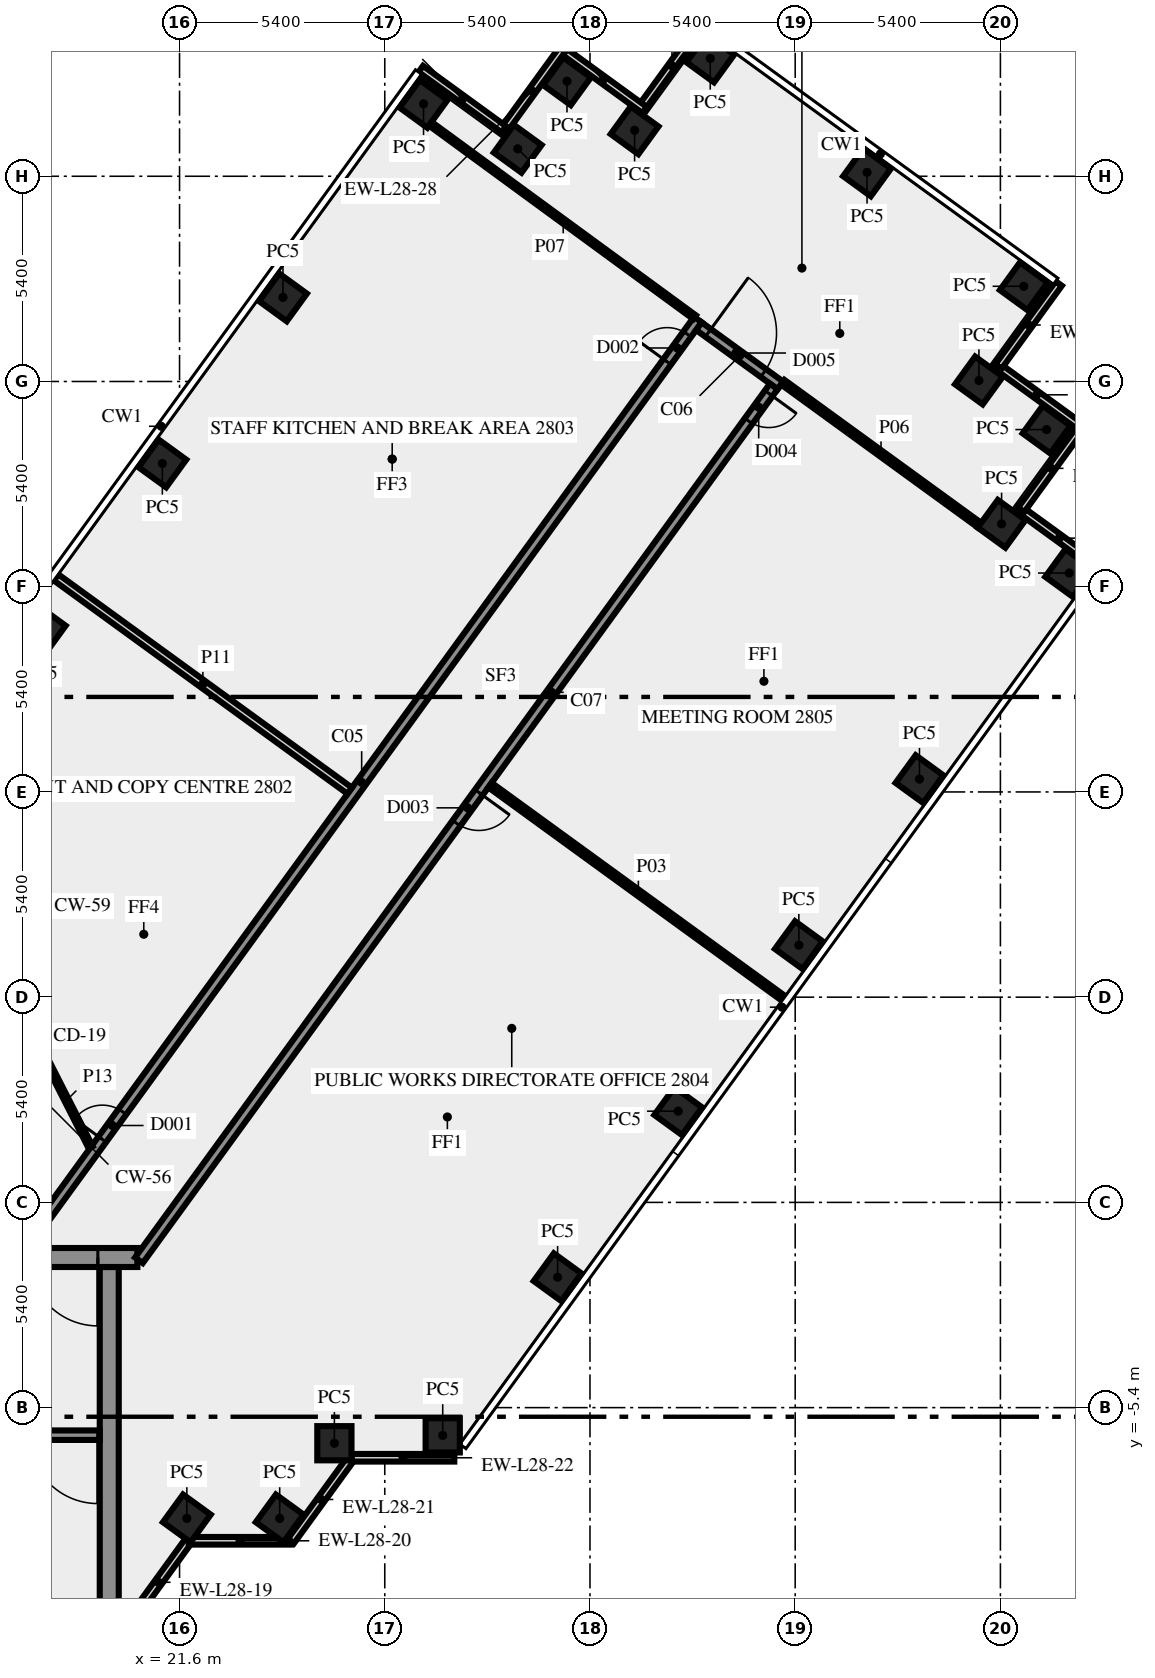
"""IFC4 building model, lengths in metres.
Left out: names, types, materials, properties, quantities, classifications, styles, units other than length and angle.
Written with IfcOpenShell. Run it as: python <this file> out.ifc"""

import sys

from ifc_helpers import new_model, si_unit, direction, frame, frame_2d, origin, origin_2d, place, context, subcontext, project, spatial, rectangle, extrude, element, fill, save


model = new_model("IFC4")
c1 = context("Model", 3, precision=1e-05, world=origin(), true_north=direction((0.0, 1.0)))
c2 = subcontext(c1, "Body", "Model", "MODEL_VIEW")
j1 = project(units=[si_unit("LENGTHUNIT", "METRE"), si_unit("PLANEANGLEUNIT", "RADIAN")], contexts=[c1])
p1 = place(None, origin())
s1 = spatial("IfcSite", under=j1, at=p1, CompositionType="ELEMENT")
p2 = place(p1, origin())
s2 = spatial("IfcBuilding", under=s1, at=p2, CompositionType="ELEMENT")
p3 = place(p2, frame((0.0, 0.0, 121.0)))
s3 = spatial("IfcBuildingStorey", under=s2, at=p3, CompositionType="ELEMENT", Elevation=121.0)
for number, where, z_axis, x_axis in (
    (1, (21.792, -8.315, 0.0), (0.0, 0.0, 1.0), (0.588, 0.809, 0.0)),
    (2, (24.235, -8.315, 0.0), (0.0, 0.0, 1.0), (0.588, 0.809, 0.0)),
    (3, (25.674, -6.337, 0.0), (0.0, 0.0, 1.0), (1.0, 0.0, 0.0)),
    (4, (28.525, -6.13, 0.0), (0.0, 0.0, 1.0), (1.0, 0.0, 0.0)),
    (5, (31.548, -1.969, 0.0), (0.0, 0.0, 1.0), (0.588, 0.809, 0.0)),
    (6, (34.722, 2.4, 0.0), (0.0, 0.0, 1.0), (0.588, 0.809, 0.0)),
    (7, (37.896, 6.769, 0.0), (0.0, 0.0, 1.0), (0.588, 0.809, 0.0)),
    (8, (41.07, 11.137, 0.0), (0.0, 0.0, 1.0), (0.588, 0.809, 0.0)),
    (9, (45.01, 16.56, 0.0), (0.0, 0.0, 1.0), (0.588, 0.809, 0.0)),
    (10, (43.231, 17.854, 0.0), (0.0, 0.0, 1.0), (0.588, 0.809, 0.0)),
    (11, (44.415, 20.335, 0.0), (0.0, 0.0, 1.0), (0.588, 0.809, 0.0)),
    (12, (42.635, 21.626, 0.0), (0.0, 0.0, 1.0), (-0.809, 0.588, 0.0)),
    (13, (43.815, 24.105, 0.0), (0.0, 0.0, 1.0), (-0.809, 0.588, 0.0)),
    (14, (39.691, 27.102, 0.0), (0.0, 0.0, 1.0), (-0.809, 0.588, 0.0)),
    (15, (35.565, 30.1, 0.0), (0.0, 0.0, 1.0), (-0.588, -0.809, 0.0)),
    (16, (33.574, 28.209, 0.0), (0.0, 0.0, 1.0), (-0.809, 0.588, 0.0)),
    (17, (31.795, 29.5, 0.0), (0.0, 0.0, 1.0), (-0.588, -0.809, 0.0)),
    (18, (30.499, 27.723, 0.0), (0.0, 0.0, 1.0), (-0.809, 0.588, 0.0)),
    (19, (28.02, 28.905, 0.0), (0.0, 0.0, 1.0), (-0.809, 0.588, 0.0)),
    (20, (24.321, 23.812, 0.0), (0.0, 0.0, 1.0), (-0.588, -0.809, 0.0)),
    (21, (21.147, 19.444, 0.0), (0.0, 0.0, 1.0), (-0.588, -0.809, 0.0)),
    (22, (17.974, 15.075, 0.0), (0.0, 0.0, 1.0), (-0.588, -0.809, 0.0)),
):
    element("IfcColumn", number, at=place(p3, frame(where, z_axis=z_axis, x_axis=x_axis)), inside=s3, PredefinedType="COLUMN", context=c2, shape_type="SweptSolid", body=[
        extrude(rectangle(XDim=0.9, YDim=0.9, at=origin_2d()), origin(), (0.0, 0.0, 1.0), 3.65),
    ])
for number, where, z_axis, x_axis in (
    (23, (45.842, 16.685, 0.0), (0.0, 0.0, 1.0), (-0.809, 0.588, 0.0)),
    (24, (43.746, 18.223, 0.0), (0.0, 0.0, 1.0), (0.588, 0.809, 0.0)),
    (25, (45.245, 20.456, 0.0), (0.0, 0.0, 1.0), (-0.809, 0.588, 0.0)),
):
    element("IfcWall", number, at=place(p3, frame(where, z_axis=z_axis, x_axis=x_axis)), inside=s3, PredefinedType="SOLIDWALL", context=c2, shape_type="SweptSolid", body=[
        extrude(rectangle(XDim=2.7, YDim=0.2, at=frame_2d((1.35, 0.0))), origin(), (0.0, 0.0, 1.0), 3.65),
    ])
p4 = place(p3, frame((20.253, -11.083, 0.0), z_axis=(0.0, 0.0, 1.0), x_axis=(0.587766567315, 0.809030569476, 0.0)))
e26 = element("IfcWall", 26, at=p4, inside=s3, PredefinedType="SOLIDWALL", context=c2, shape_type="SweptSolid", body=[
    extrude(rectangle(XDim=2.688, YDim=0.2, at=frame_2d((1.344, 0.0))), origin(), (0.0, 0.0, 1.0), 3.65),
])
p5 = place(p3, frame((21.843, -8.904, 0.0), z_axis=(0.0, 0.0, 1.0), x_axis=(1.0, 0.0, 0.0)))
e27 = element("IfcWall", 27, at=p5, inside=s3, PredefinedType="SOLIDWALL", context=c2, shape_type="SweptSolid", body=[
    extrude(rectangle(XDim=2.7, YDim=0.2, at=frame_2d((1.35, 0.0))), origin(), (0.0, 0.0, 1.0), 3.65),
])
p6 = place(p3, frame((24.533, -8.909, 0.0), z_axis=(0.0, 0.0, 1.0), x_axis=(0.587720002413, 0.809064397168, 0.0)))
e28 = element("IfcWall", 28, at=p6, inside=s3, PredefinedType="SOLIDWALL", context=c2, shape_type="SweptSolid", body=[
    extrude(rectangle(XDim=2.7, YDim=0.2, at=frame_2d((1.35, 0.0))), origin(), (0.0, 0.0, 1.0), 3.65),
])
for number, where, z_axis, x_axis in (
    (29, (26.13, -6.719, 0.0), (0.0, 0.0, 1.0), (1.0, 0.0, 0.0)),
    (30, (43.149, 21.994, 0.0), (0.0, 0.0, 1.0), (0.588, 0.809, 0.0)),
    (31, (35.351, 30.997, 0.0), (0.0, 0.0, 1.0), (-0.588, -0.809, 0.0)),
    (32, (33.838, 28.744, 0.0), (0.0, 0.0, 1.0), (-0.809, 0.588, 0.0)),
    (33, (31.67, 30.333, 0.0), (0.0, 0.0, 1.0), (-0.588, -0.809, 0.0)),
    (34, (30.133, 28.237, 0.0), (0.0, 0.0, 1.0), (-0.809, 0.588, 0.0)),
):
    element("IfcWall", number, at=place(p3, frame(where, z_axis=z_axis, x_axis=x_axis)), inside=s3, PredefinedType="SOLIDWALL", context=c2, shape_type="SweptSolid", body=[
        extrude(rectangle(XDim=2.7, YDim=0.2, at=frame_2d((1.35, 0.0))), origin(), (0.0, 0.0, 1.0), 3.65),
    ])
p7 = place(p3, frame((19.75, -10.5, 0.0), z_axis=(0.0, 0.0, 1.0), x_axis=(0.0, 1.0, 0.0)))
e35 = element("IfcWall", 35, at=p7, inside=s3, PredefinedType="SHEAR", context=c2, shape_type="SweptSolid", body=[
    extrude(rectangle(XDim=8.8, YDim=0.5, at=frame_2d((4.4, 0.0))), origin(), (0.0, 0.0, 1.0), 3.65),
])
p8 = place(p3, frame((19.5, -6.125, 0.0), z_axis=(0.0, 0.0, 1.0), x_axis=(-1.0, 0.0, 0.0)))
e36 = element("IfcWall", 36, at=p8, inside=s3, PredefinedType="SHEAR", context=c2, shape_type="SweptSolid", body=[
    extrude(rectangle(XDim=8.05, YDim=0.25, at=frame_2d((4.025, 0.0))), origin(), (0.0, 0.0, 1.0), 3.65),
])
p9 = place(p8, frame((0.05, 0.0, 0.0)))
e37 = element("IfcOpeningElement", 37, at=p9, cuts=e36, PredefinedType="OPENING", context=c2, shape_type="SweptSolid", body=[
    extrude(rectangle(XDim=1.8, YDim=2.1, at=frame_2d((0.9, 1.05))), frame((0.0, 0.135, 0.0), z_axis=(0.0, -1.0, 0.0), x_axis=(1.0, 0.0, 0.0)), (0.0, 0.0, 1.0), 0.27),
])
p10 = place(p3, frame((20.49, -1.45, 0.0), z_axis=(0.0, 0.0, 1.0), x_axis=(-1.0, 0.0, 0.0)))
e38 = element("IfcWall", 38, at=p10, inside=s3, PredefinedType="SHEAR", context=c2, shape_type="SweptSolid", body=[
    extrude(rectangle(XDim=40.98, YDim=0.5, at=frame_2d((20.49, 0.0))), origin(), (0.0, 0.0, 1.0), 3.65),
])
p11 = place(p10, frame((38.14, 0.0, 0.0)))
e39 = element("IfcOpeningElement", 39, at=p11, cuts=e38, PredefinedType="OPENING", context=c2, shape_type="SweptSolid", body=[
    extrude(rectangle(XDim=1.8, YDim=2.1, at=frame_2d((0.9, 1.05))), frame((0.0, 0.26, 0.0), z_axis=(0.0, -1.0, 0.0), x_axis=(1.0, 0.0, 0.0)), (0.0, 0.0, 1.0), 0.52),
])
p12 = place(p10, frame((35.89, 0.0, 0.0)))
e40 = element("IfcOpeningElement", 40, at=p12, cuts=e38, PredefinedType="OPENING", context=c2, shape_type="SweptSolid", body=[
    extrude(rectangle(XDim=0.9, YDim=2.1, at=frame_2d((0.45, 1.05))), frame((0.0, 0.26, 0.0), z_axis=(0.0, -1.0, 0.0), x_axis=(1.0, 0.0, 0.0)), (0.0, 0.0, 1.0), 0.52),
])
p13 = place(p10, frame((32.94, 0.0, 0.0)))
e41 = element("IfcOpeningElement", 41, at=p13, cuts=e38, PredefinedType="OPENING", context=c2, shape_type="SweptSolid", body=[
    extrude(rectangle(XDim=0.9, YDim=2.1, at=frame_2d((0.45, 1.05))), frame((0.0, 0.26, 0.0), z_axis=(0.0, -1.0, 0.0), x_axis=(1.0, 0.0, 0.0)), (0.0, 0.0, 1.0), 0.52),
])
p14 = place(p10, frame((19.59, 0.0, 0.0)))
e42 = element("IfcOpeningElement", 42, at=p14, cuts=e38, PredefinedType="OPENING", context=c2, shape_type="SweptSolid", body=[
    extrude(rectangle(XDim=2.0, YDim=2.1, at=frame_2d((1.0, 1.05))), frame((0.0, 0.26, 0.0), z_axis=(0.0, -1.0, 0.0), x_axis=(1.0, 0.0, 0.0)), (0.0, 0.0, 1.0), 0.52),
])
p15 = place(p10, frame((7.14, 0.0, 0.0)))
e43 = element("IfcOpeningElement", 43, at=p15, cuts=e38, PredefinedType="OPENING", context=c2, shape_type="SweptSolid", body=[
    extrude(rectangle(XDim=0.9, YDim=2.1, at=frame_2d((0.45, 1.05))), frame((0.0, 0.26, 0.0), z_axis=(0.0, -1.0, 0.0), x_axis=(1.0, 0.0, 0.0)), (0.0, 0.0, 1.0), 0.52),
])
p16 = place(p10, frame((5.028, 0.0, 0.0)))
e44 = element("IfcOpeningElement", 44, at=p16, cuts=e38, PredefinedType="OPENING", context=c2, shape_type="SweptSolid", body=[
    extrude(rectangle(XDim=0.8, YDim=2.1, at=frame_2d((0.4, 1.05))), frame((0.0, 0.26, 0.0), z_axis=(0.0, -1.0, 0.0), x_axis=(1.0, 0.0, 0.0)), (0.0, 0.0, 1.0), 0.52),
])
p17 = place(p10, frame((3.452, 0.0, 0.0)))
e45 = element("IfcOpeningElement", 45, at=p17, cuts=e38, PredefinedType="OPENING", context=c2, shape_type="SweptSolid", body=[
    extrude(rectangle(XDim=0.8, YDim=2.1, at=frame_2d((0.4, 1.05))), frame((0.0, 0.26, 0.0), z_axis=(0.0, -1.0, 0.0), x_axis=(1.0, 0.0, 0.0)), (0.0, 0.0, 1.0), 0.52),
])
p18 = place(p10, frame((1.04, 0.0, 0.0)))
e46 = element("IfcOpeningElement", 46, at=p18, cuts=e38, PredefinedType="OPENING", context=c2, shape_type="SweptSolid", body=[
    extrude(rectangle(XDim=1.8, YDim=2.1, at=frame_2d((0.9, 1.05))), frame((0.0, 0.26, 0.0), z_axis=(0.0, -1.0, 0.0), x_axis=(1.0, 0.0, 0.0)), (0.0, 0.0, 1.0), 0.52),
])
p19 = place(p3, frame((17.545, -1.125, 0.0), z_axis=(0.0, 0.0, 1.0), x_axis=(0.587786330937, 0.809016210693, 0.0)))
e47 = element("IfcWall", 47, at=p19, inside=s3, PredefinedType="SOLIDWALL", context=c2, shape_type="SweptSolid", body=[
    extrude(rectangle(XDim=30.103, YDim=0.25, at=frame_2d((15.052, 0.0))), origin(), (0.0, 0.0, 1.0), 3.65),
])
p20 = place(p19, frame((3.441, 0.0, 0.0)))
e48 = element("IfcOpeningElement", 48, at=p20, cuts=e47, PredefinedType="OPENING", context=c2, shape_type="SweptSolid", body=[
    extrude(rectangle(XDim=0.9, YDim=2.1, at=frame_2d((0.45, 1.05))), frame((0.0, 0.135, 0.0), z_axis=(0.0, -1.0, 0.0), x_axis=(1.0, 0.0, 0.0)), (0.0, 0.0, 1.0), 0.27),
])
p21 = place(p19, frame((28.729, 0.0, 0.0)))
e49 = element("IfcOpeningElement", 49, at=p21, cuts=e47, PredefinedType="OPENING", context=c2, shape_type="SweptSolid", body=[
    extrude(rectangle(XDim=0.9, YDim=2.1, at=frame_2d((0.45, 1.05))), frame((0.0, 0.135, 0.0), z_axis=(0.0, -1.0, 0.0), x_axis=(1.0, 0.0, 0.0)), (0.0, 0.0, 1.0), 0.27),
])
p22 = place(p3, frame((35.267, 23.054, 0.0), z_axis=(0.0, 0.0, 1.0), x_axis=(0.809038743598, -0.587755315891, 0.0)))
e50 = element("IfcWall", 50, at=p22, inside=s3, PredefinedType="SOLIDWALL", context=c2, shape_type="SweptSolid", body=[
    extrude(rectangle(XDim=2.65, YDim=0.25, at=frame_2d((1.325, 0.0))), origin(), (0.0, 0.0, 1.0), 3.65),
])
p23 = place(p22, frame((0.3, 0.0, 0.0)))
e51 = element("IfcOpeningElement", 51, at=p23, cuts=e50, PredefinedType="OPENING", context=c2, shape_type="SweptSolid", body=[
    extrude(rectangle(XDim=1.8, YDim=2.1, at=frame_2d((0.9, 1.05))), frame((0.0, 0.135, 0.0), z_axis=(0.0, -1.0, 0.0), x_axis=(1.0, 0.0, 0.0)), (0.0, 0.0, 1.0), 0.27),
])
p24 = place(p3, frame((37.236, 21.469, 0.0), z_axis=(0.0, 0.0, 1.0), x_axis=(-0.58778344073, -0.809018310549, 0.0)))
e52 = element("IfcWall", 52, at=p24, inside=s3, PredefinedType="SOLIDWALL", context=c2, shape_type="SweptSolid", body=[
    extrude(rectangle(XDim=28.42, YDim=0.25, at=frame_2d((14.21, 0.0))), origin(), (0.0, 0.0, 1.0), 3.65),
])
p25 = place(p24, frame((13.205, 0.0, 0.0)))
e53 = element("IfcOpeningElement", 53, at=p25, cuts=e52, PredefinedType="OPENING", context=c2, shape_type="SweptSolid", body=[
    extrude(rectangle(XDim=1.0, YDim=2.1, at=frame_2d((0.5, 1.05))), frame((0.0, 0.135, 0.0), z_axis=(0.0, -1.0, 0.0), x_axis=(1.0, 0.0, 0.0)), (0.0, 0.0, 1.0), 0.27),
])
p26 = place(p24, frame((0.224, 0.0, 0.0)))
e54 = element("IfcOpeningElement", 54, at=p26, cuts=e52, PredefinedType="OPENING", context=c2, shape_type="SweptSolid", body=[
    extrude(rectangle(XDim=0.9, YDim=2.1, at=frame_2d((0.45, 1.05))), frame((0.0, 0.135, 0.0), z_axis=(0.0, -1.0, 0.0), x_axis=(1.0, 0.0, 0.0)), (0.0, 0.0, 1.0), 0.27),
])
p27 = place(p3, frame((37.577, 5.307, 0.0), z_axis=(0.0, 0.0, 1.0), x_axis=(-0.809032429128, 0.587764007591, 0.0)))
e55 = element("IfcWall", 55, at=p27, inside=s3, PredefinedType="PARTITIONING", context=c2, shape_type="SweptSolid", body=[
    extrude(rectangle(XDim=9.651, YDim=0.15, at=frame_2d((4.826, 0.0))), origin(), (0.0, 0.0, 1.0), 2.75),
])
p28 = place(p3, frame((42.646, 17.823, 0.0), z_axis=(0.0, 0.0, 1.0), x_axis=(-0.80900675786, 0.587799341388, 0.0)))
e56 = element("IfcWall", 56, at=p28, inside=s3, PredefinedType="PARTITIONING", context=c2, shape_type="SweptSolid", body=[
    extrude(rectangle(XDim=6.395, YDim=0.15, at=frame_2d((3.197, 0.0))), origin(), (0.0, 0.0, 1.0), 3.65),
])
p29 = place(p3, frame((28.238, 28.352, 0.0), z_axis=(0.0, 0.0, 1.0), x_axis=(0.806980651863, -0.590577875913, 0.0)))
e57 = element("IfcWall", 57, at=p29, inside=s3, PredefinedType="PARTITIONING", context=c2, shape_type="SweptSolid", body=[
    extrude(rectangle(XDim=8.57, YDim=0.12, at=frame_2d((4.285, 0.0))), origin(), (0.0, 0.0, 1.0), 3.65),
])
p30 = place(p3, frame((26.077, 10.832, 0.0), z_axis=(0.0, 0.0, 1.0), x_axis=(-0.809052142986, 0.587736871338, 0.0)))
e58 = element("IfcWall", 58, at=p30, inside=s3, PredefinedType="SOLIDWALL", context=c2, shape_type="SweptSolid", body=[
    extrude(rectangle(XDim=9.55, YDim=0.2, at=frame_2d((4.775, 0.0))), origin(), (0.0, 0.0, 1.0), 2.75),
])
p31 = place(p3, frame((18.0, 3.925, 0.0), z_axis=(0.0, 0.0, 1.0), x_axis=(0.453950796792, -0.891026752736, 0.0)))
e59 = element("IfcWall", 59, at=p31, inside=s3, PredefinedType="PARTITIONING", context=c2, shape_type="SweptSolid", body=[
    extrude(rectangle(XDim=2.778, YDim=0.12, at=frame_2d((1.389, 0.0))), origin(), (0.0, 0.0, 1.0), 3.65),
])
p32 = place(p9, origin())
e60 = element("IfcDoor", 60, at=p32, inside=s3, OperationType="DOUBLE_DOOR_SINGLE_SWING", PredefinedType="DOOR", context=c2, shape_type="SweptSolid", body=[
    extrude(rectangle(XDim=1.8, YDim=2.1, at=frame_2d((0.9, 1.05))), frame((0.0, 0.025, 0.0), z_axis=(0.0, -1.0, 0.0), x_axis=(1.0, 0.0, 0.0)), (0.0, 0.0, 1.0), 0.05),
])
fill(e37, e60)
p33 = place(p18, origin())
e61 = element("IfcDoor", 61, at=p33, inside=s3, OperationType="DOUBLE_DOOR_SINGLE_SWING", PredefinedType="DOOR", context=c2, shape_type="SweptSolid", body=[
    extrude(rectangle(XDim=1.8, YDim=2.1, at=frame_2d((0.9, 1.05))), frame((0.0, 0.025, 0.0), z_axis=(0.0, -1.0, 0.0), x_axis=(1.0, 0.0, 0.0)), (0.0, 0.0, 1.0), 0.05),
])
fill(e46, e61)
p34 = place(p25, origin())
e62 = element("IfcDoor", 62, at=p34, inside=s3, OperationType="SINGLE_SWING_LEFT", PredefinedType="DOOR", context=c2, shape_type="SweptSolid", body=[
    extrude(rectangle(XDim=1.0, YDim=2.1, at=frame_2d((0.5, 1.05))), frame((0.0, 0.025, 0.0), z_axis=(0.0, -1.0, 0.0), x_axis=(1.0, 0.0, 0.0)), (0.0, 0.0, 1.0), 0.05),
])
fill(e53, e62)
p35 = place(p26, origin())
e63 = element("IfcDoor", 63, at=p35, inside=s3, OperationType="SINGLE_SWING_LEFT", PredefinedType="DOOR", context=c2, shape_type="SweptSolid", body=[
    extrude(rectangle(XDim=0.9, YDim=2.1, at=frame_2d((0.45, 1.05))), frame((0.0, 0.025, 0.0), z_axis=(0.0, -1.0, 0.0), x_axis=(1.0, 0.0, 0.0)), (0.0, 0.0, 1.0), 0.05),
])
fill(e54, e63)
p36 = place(p23, origin())
e64 = element("IfcDoor", 64, at=p36, inside=s3, OperationType="DOUBLE_DOOR_SINGLE_SWING", PredefinedType="DOOR", context=c2, shape_type="SweptSolid", body=[
    extrude(rectangle(XDim=1.8, YDim=2.1, at=frame_2d((0.9, 1.05))), frame((0.0, 0.025, 0.0), z_axis=(0.0, -1.0, 0.0), x_axis=(1.0, 0.0, 0.0)), (0.0, 0.0, 1.0), 0.05),
])
fill(e51, e64)
p37 = place(p20, origin())
e65 = element("IfcDoor", 65, at=p37, inside=s3, OperationType="SINGLE_SWING_LEFT", PredefinedType="DOOR", context=c2, shape_type="SweptSolid", body=[
    extrude(rectangle(XDim=0.9, YDim=2.1, at=frame_2d((0.45, 1.05))), frame((0.0, 0.025, 0.0), z_axis=(0.0, -1.0, 0.0), x_axis=(1.0, 0.0, 0.0)), (0.0, 0.0, 1.0), 0.05),
])
fill(e48, e65)
p38 = place(p21, origin())
e66 = element("IfcDoor", 66, at=p38, inside=s3, OperationType="SINGLE_SWING_RIGHT", PredefinedType="DOOR", context=c2, shape_type="SweptSolid", body=[
    extrude(rectangle(XDim=0.9, YDim=2.1, at=frame_2d((0.45, 1.05))), frame((0.0, 0.025, 0.0), z_axis=(0.0, -1.0, 0.0), x_axis=(1.0, 0.0, 0.0)), (0.0, 0.0, 1.0), 0.05),
])
fill(e49, e66)
save(model, sys.argv[1])
